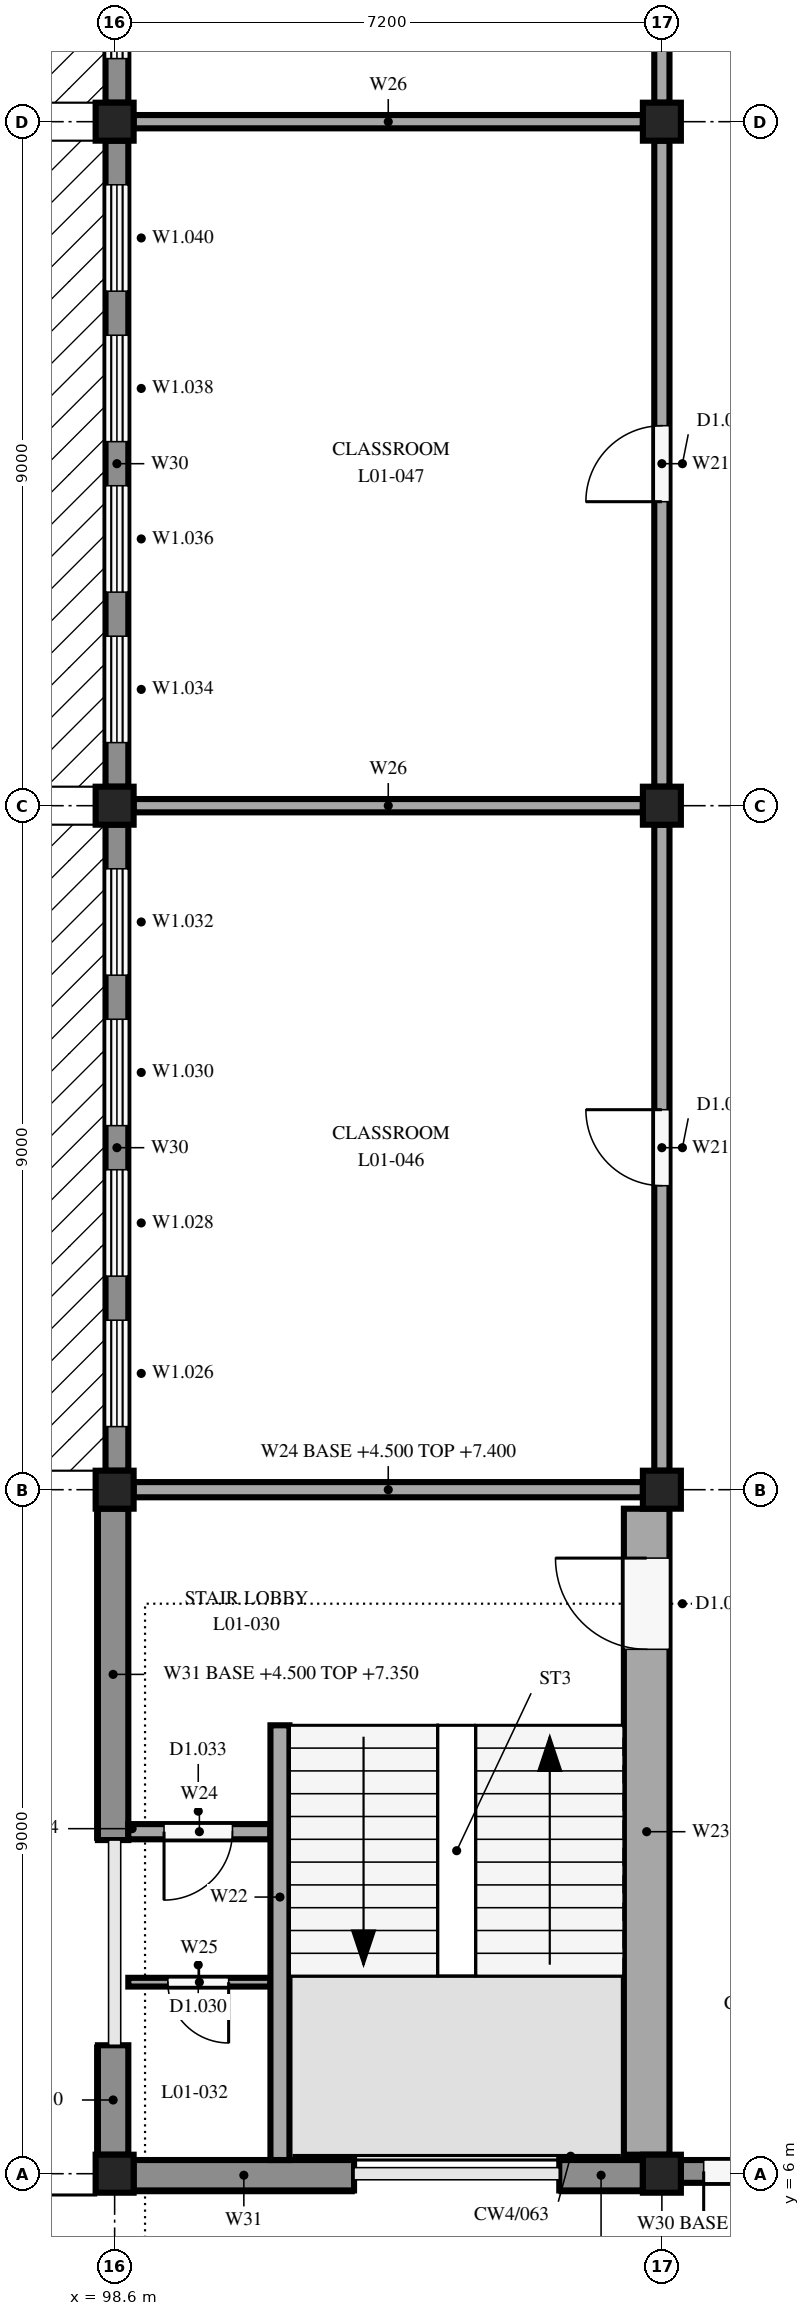
"""IFC4 building model, lengths in metres.
Left out: names, types, materials, properties, quantities, classifications, styles, units other than length and angle.
Written with IfcOpenShell. Run it as: python <this file> out.ifc"""

import sys

from ifc_helpers import new_model, si_unit, direction, frame, frame_2d, origin, origin_2d, place, context, subcontext, project, spatial, rectangle, extrude, element, fill, save


model = new_model("IFC4")
c1 = context("Model", 3, precision=1e-05, world=origin(), true_north=direction((0.0, 1.0)))
c2 = subcontext(c1, "Body", "Model", "MODEL_VIEW")
j1 = project(units=[si_unit("LENGTHUNIT", "METRE"), si_unit("PLANEANGLEUNIT", "RADIAN")], contexts=[c1])
p1 = place(None, origin())
s1 = spatial("IfcSite", under=j1, at=p1, CompositionType="ELEMENT")
p2 = place(p1, origin())
s2 = spatial("IfcBuilding", under=s1, at=p2, CompositionType="ELEMENT")
p3 = place(p2, frame((0.0, 0.0, 4.5)))
s3 = spatial("IfcBuildingStorey", under=s2, at=p3, CompositionType="ELEMENT", Elevation=4.5)
for number, where, z_axis, x_axis in (
    (1, (98.6, 6.0, 0.0), (0.0, 0.0, 1.0), (1.0, 0.0, 0.0)),
    (2, (98.6, 15.0, 0.0), (0.0, 0.0, 1.0), (1.0, 0.0, 0.0)),
    (3, (98.6, 24.0, 0.0), (0.0, 0.0, 1.0), (1.0, 0.0, 0.0)),
    (4, (98.6, 33.0, 0.0), (0.0, 0.0, 1.0), (1.0, 0.0, 0.0)),
    (5, (105.8, 6.0, 0.0), (0.0, 0.0, 1.0), (1.0, 0.0, 0.0)),
    (6, (105.8, 15.0, 0.0), (0.0, 0.0, 1.0), (1.0, 0.0, 0.0)),
    (7, (105.8, 24.0, 0.0), (0.0, 0.0, 1.0), (1.0, 0.0, 0.0)),
    (8, (105.8, 33.0, 0.0), (0.0, 0.0, 1.0), (1.0, 0.0, 0.0)),
):
    element("IfcColumn", number, at=place(p3, frame(where, z_axis=z_axis, x_axis=x_axis)), inside=s3, PredefinedType="COLUMN", context=c2, shape_type="SweptSolid", body=[
        extrude(rectangle(XDim=0.5, YDim=0.5, at=origin_2d()), origin(), (0.0, 0.0, 1.0), 3.35),
    ])
p4 = place(p3, frame((98.58, 6.25, 0.0), z_axis=(0.0, 0.0, 1.0), x_axis=(0.0, 1.0, 0.0)))
e9 = element("IfcWall", 9, at=p4, inside=s3, PredefinedType="STANDARD", context=c2, shape_type="SweptSolid", body=[
    extrude(rectangle(XDim=1.44, YDim=0.4, at=frame_2d((0.72, 0.0))), origin(), (0.0, 0.0, 1.0), 2.85),
])
p5 = place(p3, frame((98.58, 10.39, 0.0), z_axis=(0.0, 0.0, 1.0), x_axis=(0.0, 1.0, 0.0)))
e10 = element("IfcWall", 10, at=p5, inside=s3, PredefinedType="STANDARD", context=c2, shape_type="SweptSolid", body=[
    extrude(rectangle(XDim=4.36, YDim=0.4, at=frame_2d((2.18, 0.0))), origin(), (0.0, 0.0, 1.0), 2.85),
])
p6 = place(p3, frame((98.63, 15.25, 0.0), z_axis=(0.0, 0.0, 1.0), x_axis=(0.0, 1.0, 0.0)))
e11 = element("IfcWall", 11, at=p6, inside=s3, PredefinedType="STANDARD", context=c2, shape_type="SweptSolid", body=[
    extrude(rectangle(XDim=8.5, YDim=0.3, at=frame_2d((4.25, 0.0))), origin(), (0.0, 0.0, 1.0), 2.85),
])
p7 = place(p6, frame((0.58, 0.0, 0.6)))
e12 = element("IfcOpeningElement", 12, at=p7, cuts=e11, PredefinedType="OPENING", context=c2, shape_type="SweptSolid", body=[
    extrude(rectangle(XDim=1.4, YDim=2.2, at=frame_2d((0.7, 1.1))), frame((0.0, 0.16, 0.0), z_axis=(0.0, -1.0, 0.0), x_axis=(1.0, 0.0, 0.0)), (0.0, 0.0, 1.0), 0.32),
])
p8 = place(p6, frame((2.56, 0.0, 0.6)))
e13 = element("IfcOpeningElement", 13, at=p8, cuts=e11, PredefinedType="OPENING", context=c2, shape_type="SweptSolid", body=[
    extrude(rectangle(XDim=1.4, YDim=2.2, at=frame_2d((0.7, 1.1))), frame((0.0, 0.16, 0.0), z_axis=(0.0, -1.0, 0.0), x_axis=(1.0, 0.0, 0.0)), (0.0, 0.0, 1.0), 0.32),
])
p9 = place(p6, frame((4.54, 0.0, 0.6)))
e14 = element("IfcOpeningElement", 14, at=p9, cuts=e11, PredefinedType="OPENING", context=c2, shape_type="SweptSolid", body=[
    extrude(rectangle(XDim=1.4, YDim=2.2, at=frame_2d((0.7, 1.1))), frame((0.0, 0.16, 0.0), z_axis=(0.0, -1.0, 0.0), x_axis=(1.0, 0.0, 0.0)), (0.0, 0.0, 1.0), 0.32),
])
p10 = place(p6, frame((6.52, 0.0, 0.6)))
e15 = element("IfcOpeningElement", 15, at=p10, cuts=e11, PredefinedType="OPENING", context=c2, shape_type="SweptSolid", body=[
    extrude(rectangle(XDim=1.4, YDim=2.2, at=frame_2d((0.7, 1.1))), frame((0.0, 0.16, 0.0), z_axis=(0.0, -1.0, 0.0), x_axis=(1.0, 0.0, 0.0)), (0.0, 0.0, 1.0), 0.32),
])
p11 = place(p3, frame((98.63, 24.25, 0.0), z_axis=(0.0, 0.0, 1.0), x_axis=(0.0, 1.0, 0.0)))
e16 = element("IfcWall", 16, at=p11, inside=s3, PredefinedType="STANDARD", context=c2, shape_type="SweptSolid", body=[
    extrude(rectangle(XDim=8.5, YDim=0.3, at=frame_2d((4.25, 0.0))), origin(), (0.0, 0.0, 1.0), 2.85),
])
p12 = place(p11, frame((0.58, 0.0, 0.6)))
e17 = element("IfcOpeningElement", 17, at=p12, cuts=e16, PredefinedType="OPENING", context=c2, shape_type="SweptSolid", body=[
    extrude(rectangle(XDim=1.4, YDim=2.2, at=frame_2d((0.7, 1.1))), frame((0.0, 0.16, 0.0), z_axis=(0.0, -1.0, 0.0), x_axis=(1.0, 0.0, 0.0)), (0.0, 0.0, 1.0), 0.32),
])
p13 = place(p11, frame((2.56, 0.0, 0.6)))
e18 = element("IfcOpeningElement", 18, at=p13, cuts=e16, PredefinedType="OPENING", context=c2, shape_type="SweptSolid", body=[
    extrude(rectangle(XDim=1.4, YDim=2.2, at=frame_2d((0.7, 1.1))), frame((0.0, 0.16, 0.0), z_axis=(0.0, -1.0, 0.0), x_axis=(1.0, 0.0, 0.0)), (0.0, 0.0, 1.0), 0.32),
])
p14 = place(p11, frame((4.54, 0.0, 0.6)))
e19 = element("IfcOpeningElement", 19, at=p14, cuts=e16, PredefinedType="OPENING", context=c2, shape_type="SweptSolid", body=[
    extrude(rectangle(XDim=1.4, YDim=2.2, at=frame_2d((0.7, 1.1))), frame((0.0, 0.16, 0.0), z_axis=(0.0, -1.0, 0.0), x_axis=(1.0, 0.0, 0.0)), (0.0, 0.0, 1.0), 0.32),
])
p15 = place(p11, frame((6.52, 0.0, 0.6)))
e20 = element("IfcOpeningElement", 20, at=p15, cuts=e16, PredefinedType="OPENING", context=c2, shape_type="SweptSolid", body=[
    extrude(rectangle(XDim=1.4, YDim=2.2, at=frame_2d((0.7, 1.1))), frame((0.0, 0.16, 0.0), z_axis=(0.0, -1.0, 0.0), x_axis=(1.0, 0.0, 0.0)), (0.0, 0.0, 1.0), 0.32),
])
p16 = place(p3, frame((98.63, 33.25, 0.0), z_axis=(0.0, 0.0, 1.0), x_axis=(0.0, 1.0, 0.0)))
e21 = element("IfcWall", 21, at=p16, inside=s3, PredefinedType="STANDARD", context=c2, shape_type="SweptSolid", body=[
    extrude(rectangle(XDim=8.5, YDim=0.3, at=frame_2d((4.25, 0.0))), origin(), (0.0, 0.0, 1.0), 2.85),
])
p17 = place(p16, frame((0.58, 0.0, 0.6)))
e22 = element("IfcOpeningElement", 22, at=p17, cuts=e21, PredefinedType="OPENING", context=c2, shape_type="SweptSolid", body=[
    extrude(rectangle(XDim=1.4, YDim=2.2, at=frame_2d((0.7, 1.1))), frame((0.0, 0.16, 0.0), z_axis=(0.0, -1.0, 0.0), x_axis=(1.0, 0.0, 0.0)), (0.0, 0.0, 1.0), 0.32),
])
p18 = place(p16, frame((2.56, 0.0, 0.6)))
e23 = element("IfcOpeningElement", 23, at=p18, cuts=e21, PredefinedType="OPENING", context=c2, shape_type="SweptSolid", body=[
    extrude(rectangle(XDim=1.4, YDim=2.2, at=frame_2d((0.7, 1.1))), frame((0.0, 0.16, 0.0), z_axis=(0.0, -1.0, 0.0), x_axis=(1.0, 0.0, 0.0)), (0.0, 0.0, 1.0), 0.32),
])
p19 = place(p16, frame((4.54, 0.0, 0.6)))
e24 = element("IfcOpeningElement", 24, at=p19, cuts=e21, PredefinedType="OPENING", context=c2, shape_type="SweptSolid", body=[
    extrude(rectangle(XDim=1.4, YDim=2.2, at=frame_2d((0.7, 1.1))), frame((0.0, 0.16, 0.0), z_axis=(0.0, -1.0, 0.0), x_axis=(1.0, 0.0, 0.0)), (0.0, 0.0, 1.0), 0.32),
])
p20 = place(p16, frame((6.52, 0.0, 0.6)))
e25 = element("IfcOpeningElement", 25, at=p20, cuts=e21, PredefinedType="OPENING", context=c2, shape_type="SweptSolid", body=[
    extrude(rectangle(XDim=1.4, YDim=2.2, at=frame_2d((0.7, 1.1))), frame((0.0, 0.16, 0.0), z_axis=(0.0, -1.0, 0.0), x_axis=(1.0, 0.0, 0.0)), (0.0, 0.0, 1.0), 0.32),
])
p21 = place(p3, frame((101.75, 5.98, 0.0), z_axis=(0.0, 0.0, 1.0), x_axis=(-1.0, 0.0, 0.0)))
e26 = element("IfcWall", 26, at=p21, inside=s3, PredefinedType="STANDARD", context=c2, shape_type="SweptSolid", body=[
    extrude(rectangle(XDim=2.9, YDim=0.4, at=frame_2d((1.45, 0.0))), origin(), (0.0, 0.0, 1.0), 2.9),
])
p22 = place(p3, frame((105.55, 5.98, 0.0), z_axis=(0.0, 0.0, 1.0), x_axis=(-1.0, 0.0, 0.0)))
e27 = element("IfcWall", 27, at=p22, inside=s3, PredefinedType="STANDARD", context=c2, shape_type="SweptSolid", body=[
    extrude(rectangle(XDim=1.1, YDim=0.4, at=frame_2d((0.55, 0.0))), origin(), (0.0, 0.0, 1.0), 2.9),
])
p23 = place(p3, frame((108.25, 6.03, 0.0), z_axis=(0.0, 0.0, 1.0), x_axis=(-1.0, 0.0, 0.0)))
e28 = element("IfcWall", 28, at=p23, inside=s3, PredefinedType="STANDARD", context=c2, shape_type="SweptSolid", body=[
    extrude(rectangle(XDim=2.2, YDim=0.3, at=frame_2d((1.1, 0.0))), origin(), (0.0, 0.0, 1.0), 3.0),
])
p24 = place(p23, frame((0.3, 0.0, 0.0)))
e29 = element("IfcOpeningElement", 29, at=p24, cuts=e28, PredefinedType="OPENING", context=c2, shape_type="SweptSolid", body=[
    extrude(rectangle(XDim=1.6, YDim=2.4, at=frame_2d((0.8, 1.2))), frame((0.0, 0.16, 0.0), z_axis=(0.0, -1.0, 0.0), x_axis=(1.0, 0.0, 0.0)), (0.0, 0.0, 1.0), 0.32),
])
p25 = place(p3, frame((100.775, 6.18, 0.0), z_axis=(0.0, 0.0, 1.0), x_axis=(0.0, 1.0, 0.0)))
e30 = element("IfcWall", 30, at=p25, inside=s3, PredefinedType="SOLIDWALL", context=c2, shape_type="SweptSolid", body=[
    extrude(rectangle(XDim=5.72, YDim=0.25, at=frame_2d((2.86, 0.0))), origin(), (0.0, 0.0, 1.0), 3.35),
])
p26 = place(p3, frame((105.6, 6.25, 0.0), z_axis=(0.0, 0.0, 1.0), x_axis=(0.0, 1.0, 0.0)))
e31 = element("IfcWall", 31, at=p26, inside=s3, PredefinedType="SOLIDWALL", context=c2, shape_type="SweptSolid", body=[
    extrude(rectangle(XDim=8.5, YDim=0.6, at=frame_2d((4.25, 0.0))), origin(), (0.0, 0.0, 1.0), 3.35),
])
p27 = place(p26, frame((6.65, 0.0, 0.0)))
e32 = element("IfcOpeningElement", 32, at=p27, cuts=e31, PredefinedType="OPENING", context=c2, shape_type="SweptSolid", body=[
    extrude(rectangle(XDim=1.2, YDim=2.1, at=frame_2d((0.6, 1.05))), frame((0.0, 0.31, 0.0), z_axis=(0.0, -1.0, 0.0), x_axis=(1.0, 0.0, 0.0)), (0.0, 0.0, 1.0), 0.62),
])
p28 = place(p3, frame((100.65, 10.5, 0.0), z_axis=(0.0, 0.0, 1.0), x_axis=(-1.0, 0.0, 0.0)))
e33 = element("IfcWall", 33, at=p28, inside=s3, PredefinedType="SOLIDWALL", context=c2, shape_type="SweptSolid", body=[
    extrude(rectangle(XDim=1.87, YDim=0.2, at=frame_2d((0.935, 0.0))), origin(), (0.0, 0.0, 1.0), 3.35),
])
p29 = place(p28, frame((0.5, 0.0, 0.0)))
e34 = element("IfcOpeningElement", 34, at=p29, cuts=e33, PredefinedType="OPENING", context=c2, shape_type="SweptSolid", body=[
    extrude(rectangle(XDim=0.9, YDim=2.1, at=frame_2d((0.45, 1.05))), frame((0.0, 0.11, 0.0), z_axis=(0.0, -1.0, 0.0), x_axis=(1.0, 0.0, 0.0)), (0.0, 0.0, 1.0), 0.22),
])
p30 = place(p3, frame((100.65, 8.52, 0.0), z_axis=(0.0, 0.0, 1.0), x_axis=(-1.0, 0.0, 0.0)))
e35 = element("IfcWall", 35, at=p30, inside=s3, PredefinedType="PARTITIONING", context=c2, shape_type="SweptSolid", body=[
    extrude(rectangle(XDim=1.87, YDim=0.115, at=frame_2d((0.935, 0.0))), origin(), (0.0, 0.0, 1.0), 3.35),
])
p31 = place(p30, frame((0.55, 0.0, 0.0)))
e36 = element("IfcOpeningElement", 36, at=p31, cuts=e35, PredefinedType="OPENING", context=c2, shape_type="SweptSolid", body=[
    extrude(rectangle(XDim=0.8, YDim=2.1, at=frame_2d((0.4, 1.05))), frame((0.0, 0.067, 0.0), z_axis=(0.0, -1.0, 0.0), x_axis=(1.0, 0.0, 0.0)), (0.0, 0.0, 1.0), 0.135),
])
p32 = place(p3, frame((98.85, 15.0, 0.0), z_axis=(0.0, 0.0, 1.0), x_axis=(1.0, 0.0, 0.0)))
e37 = element("IfcWall", 37, at=p32, inside=s3, PredefinedType="SOLIDWALL", context=c2, shape_type="SweptSolid", body=[
    extrude(rectangle(XDim=6.7, YDim=0.2, at=frame_2d((3.35, 0.0))), origin(), (0.0, 0.0, 1.0), 2.9),
])
p33 = place(p3, frame((105.8, 15.25, 0.0), z_axis=(0.0, 0.0, 1.0), x_axis=(0.0, 1.0, 0.0)))
e38 = element("IfcWall", 38, at=p33, inside=s3, PredefinedType="PARTITIONING", context=c2, shape_type="SweptSolid", body=[
    extrude(rectangle(XDim=8.5, YDim=0.2, at=frame_2d((4.25, 0.0))), origin(), (0.0, 0.0, 1.0), 2.9),
])
p34 = place(p33, frame((3.75, 0.0, 0.0)))
e39 = element("IfcOpeningElement", 39, at=p34, cuts=e38, PredefinedType="OPENING", context=c2, shape_type="SweptSolid", body=[
    extrude(rectangle(XDim=1.0, YDim=2.1, at=frame_2d((0.5, 1.05))), frame((0.0, 0.11, 0.0), z_axis=(0.0, -1.0, 0.0), x_axis=(1.0, 0.0, 0.0)), (0.0, 0.0, 1.0), 0.22),
])
p35 = place(p3, frame((105.8, 24.25, 0.0), z_axis=(0.0, 0.0, 1.0), x_axis=(0.0, 1.0, 0.0)))
e40 = element("IfcWall", 40, at=p35, inside=s3, PredefinedType="PARTITIONING", context=c2, shape_type="SweptSolid", body=[
    extrude(rectangle(XDim=8.5, YDim=0.2, at=frame_2d((4.25, 0.0))), origin(), (0.0, 0.0, 1.0), 2.9),
])
p36 = place(p35, frame((3.75, 0.0, 0.0)))
e41 = element("IfcOpeningElement", 41, at=p36, cuts=e40, PredefinedType="OPENING", context=c2, shape_type="SweptSolid", body=[
    extrude(rectangle(XDim=1.0, YDim=2.1, at=frame_2d((0.5, 1.05))), frame((0.0, 0.11, 0.0), z_axis=(0.0, -1.0, 0.0), x_axis=(1.0, 0.0, 0.0)), (0.0, 0.0, 1.0), 0.22),
])
p37 = place(p3, frame((105.8, 33.25, 0.0), z_axis=(0.0, 0.0, 1.0), x_axis=(0.0, 1.0, 0.0)))
e42 = element("IfcWall", 42, at=p37, inside=s3, PredefinedType="PARTITIONING", context=c2, shape_type="SweptSolid", body=[
    extrude(rectangle(XDim=8.5, YDim=0.2, at=frame_2d((4.25, 0.0))), origin(), (0.0, 0.0, 1.0), 2.9),
])
p38 = place(p37, frame((3.75, 0.0, 0.0)))
e43 = element("IfcOpeningElement", 43, at=p38, cuts=e42, PredefinedType="OPENING", context=c2, shape_type="SweptSolid", body=[
    extrude(rectangle(XDim=1.0, YDim=2.1, at=frame_2d((0.5, 1.05))), frame((0.0, 0.11, 0.0), z_axis=(0.0, -1.0, 0.0), x_axis=(1.0, 0.0, 0.0)), (0.0, 0.0, 1.0), 0.22),
])
for number, where, z_axis, x_axis in (
    (44, (98.85, 24.0, 0.0), (0.0, 0.0, 1.0), (1.0, 0.0, 0.0)),
    (45, (98.85, 33.0, 0.0), (0.0, 0.0, 1.0), (1.0, 0.0, 0.0)),
):
    element("IfcWall", number, at=place(p3, frame(where, z_axis=z_axis, x_axis=x_axis)), inside=s3, PredefinedType="PARTITIONING", context=c2, shape_type="SweptSolid", body=[
        extrude(rectangle(XDim=6.7, YDim=0.175, at=frame_2d((3.35, 0.0))), origin(), (0.0, 0.0, 1.0), 2.9),
    ])
p39 = place(p7, origin())
e46 = element("IfcWindow", 46, at=p39, inside=s3, PartitioningType="DOUBLE_PANEL_VERTICAL", PredefinedType="WINDOW", context=c2, shape_type="SweptSolid", body=[
    extrude(rectangle(XDim=1.4, YDim=2.2, at=frame_2d((0.7, 1.1))), frame((0.0, 0.03, 0.0), z_axis=(0.0, -1.0, 0.0), x_axis=(1.0, 0.0, 0.0)), (0.0, 0.0, 1.0), 0.06),
])
fill(e12, e46)
p40 = place(p8, origin())
e47 = element("IfcWindow", 47, at=p40, inside=s3, PartitioningType="DOUBLE_PANEL_VERTICAL", PredefinedType="WINDOW", context=c2, shape_type="SweptSolid", body=[
    extrude(rectangle(XDim=1.4, YDim=2.2, at=frame_2d((0.7, 1.1))), frame((0.0, 0.03, 0.0), z_axis=(0.0, -1.0, 0.0), x_axis=(1.0, 0.0, 0.0)), (0.0, 0.0, 1.0), 0.06),
])
fill(e13, e47)
p41 = place(p9, origin())
e48 = element("IfcWindow", 48, at=p41, inside=s3, PartitioningType="DOUBLE_PANEL_VERTICAL", PredefinedType="WINDOW", context=c2, shape_type="SweptSolid", body=[
    extrude(rectangle(XDim=1.4, YDim=2.2, at=frame_2d((0.7, 1.1))), frame((0.0, 0.03, 0.0), z_axis=(0.0, -1.0, 0.0), x_axis=(1.0, 0.0, 0.0)), (0.0, 0.0, 1.0), 0.06),
])
fill(e14, e48)
p42 = place(p10, origin())
e49 = element("IfcWindow", 49, at=p42, inside=s3, PartitioningType="DOUBLE_PANEL_VERTICAL", PredefinedType="WINDOW", context=c2, shape_type="SweptSolid", body=[
    extrude(rectangle(XDim=1.4, YDim=2.2, at=frame_2d((0.7, 1.1))), frame((0.0, 0.03, 0.0), z_axis=(0.0, -1.0, 0.0), x_axis=(1.0, 0.0, 0.0)), (0.0, 0.0, 1.0), 0.06),
])
fill(e15, e49)
p43 = place(p12, origin())
e50 = element("IfcWindow", 50, at=p43, inside=s3, PartitioningType="DOUBLE_PANEL_VERTICAL", PredefinedType="WINDOW", context=c2, shape_type="SweptSolid", body=[
    extrude(rectangle(XDim=1.4, YDim=2.2, at=frame_2d((0.7, 1.1))), frame((0.0, 0.03, 0.0), z_axis=(0.0, -1.0, 0.0), x_axis=(1.0, 0.0, 0.0)), (0.0, 0.0, 1.0), 0.06),
])
fill(e17, e50)
p44 = place(p13, origin())
e51 = element("IfcWindow", 51, at=p44, inside=s3, PartitioningType="DOUBLE_PANEL_VERTICAL", PredefinedType="WINDOW", context=c2, shape_type="SweptSolid", body=[
    extrude(rectangle(XDim=1.4, YDim=2.2, at=frame_2d((0.7, 1.1))), frame((0.0, 0.03, 0.0), z_axis=(0.0, -1.0, 0.0), x_axis=(1.0, 0.0, 0.0)), (0.0, 0.0, 1.0), 0.06),
])
fill(e18, e51)
p45 = place(p14, origin())
e52 = element("IfcWindow", 52, at=p45, inside=s3, PartitioningType="DOUBLE_PANEL_VERTICAL", PredefinedType="WINDOW", context=c2, shape_type="SweptSolid", body=[
    extrude(rectangle(XDim=1.4, YDim=2.2, at=frame_2d((0.7, 1.1))), frame((0.0, 0.03, 0.0), z_axis=(0.0, -1.0, 0.0), x_axis=(1.0, 0.0, 0.0)), (0.0, 0.0, 1.0), 0.06),
])
fill(e19, e52)
p46 = place(p15, origin())
e53 = element("IfcWindow", 53, at=p46, inside=s3, PartitioningType="DOUBLE_PANEL_VERTICAL", PredefinedType="WINDOW", context=c2, shape_type="SweptSolid", body=[
    extrude(rectangle(XDim=1.4, YDim=2.2, at=frame_2d((0.7, 1.1))), frame((0.0, 0.03, 0.0), z_axis=(0.0, -1.0, 0.0), x_axis=(1.0, 0.0, 0.0)), (0.0, 0.0, 1.0), 0.06),
])
fill(e20, e53)
p47 = place(p17, origin())
e54 = element("IfcWindow", 54, at=p47, inside=s3, PartitioningType="DOUBLE_PANEL_VERTICAL", PredefinedType="WINDOW", context=c2, shape_type="SweptSolid", body=[
    extrude(rectangle(XDim=1.4, YDim=2.2, at=frame_2d((0.7, 1.1))), frame((0.0, 0.03, 0.0), z_axis=(0.0, -1.0, 0.0), x_axis=(1.0, 0.0, 0.0)), (0.0, 0.0, 1.0), 0.06),
])
fill(e22, e54)
p48 = place(p24, origin())
e55 = element("IfcDoor", 55, at=p48, inside=s3, OperationType="DOUBLE_DOOR_SINGLE_SWING", PredefinedType="DOOR", context=c2, shape_type="SweptSolid", body=[
    extrude(rectangle(XDim=1.6, YDim=2.4, at=frame_2d((0.8, 1.2))), frame((0.0, 0.025, 0.0), z_axis=(0.0, -1.0, 0.0), x_axis=(1.0, 0.0, 0.0)), (0.0, 0.0, 1.0), 0.05),
])
fill(e29, e55)
p49 = place(p27, origin())
e56 = element("IfcDoor", 56, at=p49, inside=s3, OperationType="SINGLE_SWING_RIGHT", PredefinedType="DOOR", context=c2, shape_type="SweptSolid", body=[
    extrude(rectangle(XDim=1.2, YDim=2.1, at=frame_2d((0.6, 1.05))), frame((0.0, 0.025, 0.0), z_axis=(0.0, -1.0, 0.0), x_axis=(1.0, 0.0, 0.0)), (0.0, 0.0, 1.0), 0.05),
])
fill(e32, e56)
p50 = place(p29, origin())
e57 = element("IfcDoor", 57, at=p50, inside=s3, OperationType="SINGLE_SWING_RIGHT", PredefinedType="DOOR", context=c2, shape_type="SweptSolid", body=[
    extrude(rectangle(XDim=0.9, YDim=2.1, at=frame_2d((0.45, 1.05))), frame((0.0, 0.025, 0.0), z_axis=(0.0, -1.0, 0.0), x_axis=(1.0, 0.0, 0.0)), (0.0, 0.0, 1.0), 0.05),
])
fill(e34, e57)
p51 = place(p31, origin())
e58 = element("IfcDoor", 58, at=p51, inside=s3, OperationType="SINGLE_SWING_LEFT", PredefinedType="DOOR", context=c2, shape_type="SweptSolid", body=[
    extrude(rectangle(XDim=0.8, YDim=2.1, at=frame_2d((0.4, 1.05))), frame((0.0, 0.025, 0.0), z_axis=(0.0, -1.0, 0.0), x_axis=(1.0, 0.0, 0.0)), (0.0, 0.0, 1.0), 0.05),
])
fill(e36, e58)
p52 = place(p34, origin())
e59 = element("IfcDoor", 59, at=p52, inside=s3, OperationType="SINGLE_SWING_RIGHT", PredefinedType="DOOR", context=c2, shape_type="SweptSolid", body=[
    extrude(rectangle(XDim=1.0, YDim=2.1, at=frame_2d((0.5, 1.05))), frame((0.0, 0.025, 0.0), z_axis=(0.0, -1.0, 0.0), x_axis=(1.0, 0.0, 0.0)), (0.0, 0.0, 1.0), 0.05),
])
fill(e39, e59)
p53 = place(p36, origin())
e60 = element("IfcDoor", 60, at=p53, inside=s3, OperationType="SINGLE_SWING_LEFT", PredefinedType="DOOR", context=c2, shape_type="SweptSolid", body=[
    extrude(rectangle(XDim=1.0, YDim=2.1, at=frame_2d((0.5, 1.05))), frame((0.0, 0.025, 0.0), z_axis=(0.0, -1.0, 0.0), x_axis=(1.0, 0.0, 0.0)), (0.0, 0.0, 1.0), 0.05),
])
fill(e41, e60)
save(model, sys.argv[1])
